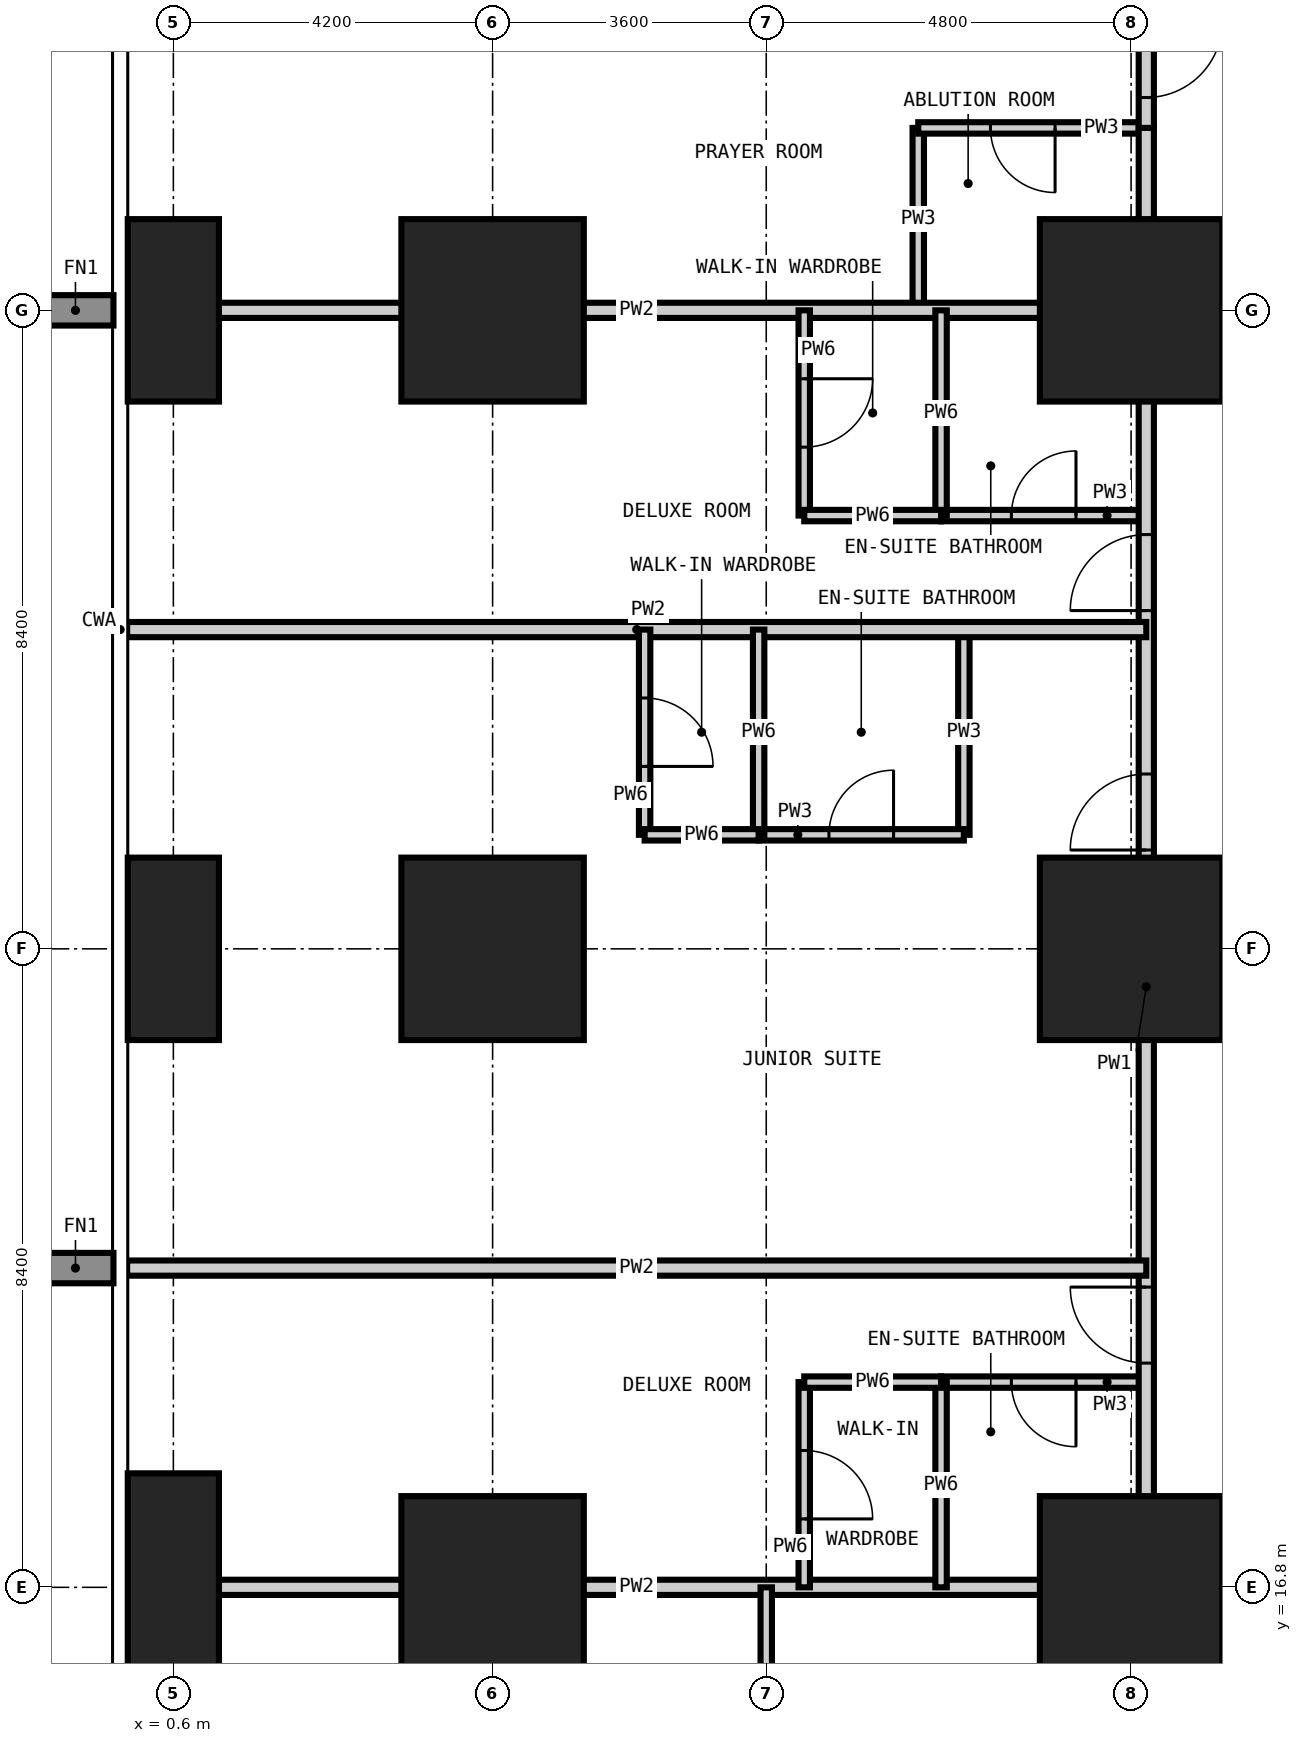
"""IFC4 building model, lengths in metres.
Left out: names, types, materials, properties, quantities, classifications, styles, units other than length and angle.
Written with IfcOpenShell. Run it as: python <this file> out.ifc"""

import sys

from ifc_helpers import new_model, si_unit, direction, frame, frame_2d, origin, origin_2d, place, context, subcontext, project, spatial, rectangle, extrude, element, fill, save


model = new_model("IFC4")
c1 = context("Model", 3, precision=1e-05, world=origin(), true_north=direction((0.0, 1.0)))
c2 = subcontext(c1, "Body", "Model", "MODEL_VIEW")
j1 = project(units=[si_unit("LENGTHUNIT", "METRE"), si_unit("PLANEANGLEUNIT", "RADIAN")], contexts=[c1])
p1 = place(None, origin())
s1 = spatial("IfcSite", under=j1, at=p1, CompositionType="ELEMENT")
p2 = place(p1, origin())
s2 = spatial("IfcBuilding", under=s1, at=p2, CompositionType="ELEMENT")
p3 = place(p2, frame((0.0, 0.0, 84.6)))
s3 = spatial("IfcBuildingStorey", under=s2, at=p3, CompositionType="ELEMENT", Elevation=84.6)
p4 = place(p3, frame((0.6, 16.8, -0.35), z_axis=(0.0, 0.0, 1.0), x_axis=(1.0, 0.0, 0.0)))
e1 = element("IfcColumn", 1, at=p4, inside=s3, PredefinedType="COLUMN", context=c2, shape_type="SweptSolid", body=[
    extrude(rectangle(XDim=1.2, YDim=3.0, at=origin_2d()), origin(), (0.0, 0.0, 1.0), 3.55),
])
for number, where, z_axis, x_axis in (
    (2, (0.6, 25.2, -0.35), (0.0, 0.0, 1.0), (1.0, 0.0, 0.0)),
    (3, (0.6, 33.6, -0.35), (0.0, 0.0, 1.0), (1.0, 0.0, 0.0)),
):
    element("IfcColumn", number, at=place(p3, frame(where, z_axis=z_axis, x_axis=x_axis)), inside=s3, PredefinedType="COLUMN", context=c2, shape_type="SweptSolid", body=[
        extrude(rectangle(XDim=1.2, YDim=2.4, at=origin_2d()), origin(), (0.0, 0.0, 1.0), 3.55),
    ])
for number, where, z_axis, x_axis in (
    (4, (4.8, 16.8, -0.35), (0.0, 0.0, 1.0), (1.0, 0.0, 0.0)),
    (5, (4.8, 25.2, -0.35), (0.0, 0.0, 1.0), (1.0, 0.0, 0.0)),
    (6, (4.8, 33.6, -0.35), (0.0, 0.0, 1.0), (1.0, 0.0, 0.0)),
    (7, (13.2, 16.8, -0.35), (0.0, 0.0, 1.0), (1.0, 0.0, 0.0)),
    (8, (13.2, 25.2, -0.35), (0.0, 0.0, 1.0), (1.0, 0.0, 0.0)),
    (9, (13.2, 33.6, -0.35), (0.0, 0.0, 1.0), (1.0, 0.0, 0.0)),
):
    element("IfcColumn", number, at=place(p3, frame(where, z_axis=z_axis, x_axis=x_axis)), inside=s3, PredefinedType="COLUMN", context=c2, shape_type="SweptSolid", body=[
        extrude(rectangle(XDim=2.4, YDim=2.4, at=origin_2d()), origin(), (0.0, 0.0, 1.0), 3.55),
    ])
p5 = place(p3, frame((10.4, 33.6, 0.0), z_axis=(0.0, 0.0, 1.0), x_axis=(0.0, 1.0, 0.0)))
e10 = element("IfcWall", 10, at=p5, inside=s3, PredefinedType="PARTITIONING", context=c2, shape_type="SweptSolid", body=[
    extrude(rectangle(XDim=2.4, YDim=0.15, at=frame_2d((1.2, 0.0))), origin(), (0.0, 0.0, 1.0), 3.2),
])
p6 = place(p3, frame((11.0, 26.7, 0.0), z_axis=(0.0, 0.0, 1.0), x_axis=(0.0, 1.0, 0.0)))
e11 = element("IfcWall", 11, at=p6, inside=s3, PredefinedType="PARTITIONING", context=c2, shape_type="SweptSolid", body=[
    extrude(rectangle(XDim=2.7, YDim=0.15, at=frame_2d((1.35, 0.0))), origin(), (0.0, 0.0, 1.0), 3.2),
])
p7 = place(p3, frame((10.7, 19.5, 0.0), z_axis=(0.0, 0.0, 1.0), x_axis=(1.0, 0.0, 0.0)))
e12 = element("IfcWall", 12, at=p7, inside=s3, PredefinedType="PARTITIONING", context=c2, shape_type="SweptSolid", body=[
    extrude(rectangle(XDim=2.7, YDim=0.15, at=frame_2d((1.35, 0.0))), origin(), (0.0, 0.0, 1.0), 3.2),
])
p8 = place(p7, frame((0.925, 0.0, 0.0)))
e13 = element("IfcOpeningElement", 13, at=p8, cuts=e12, PredefinedType="OPENING", context=c2, shape_type="SweptSolid", body=[
    extrude(rectangle(XDim=0.85, YDim=2.1, at=frame_2d((0.425, 1.05))), frame((0.0, 0.085, 0.0), z_axis=(0.0, -1.0, 0.0), x_axis=(1.0, 0.0, 0.0)), (0.0, 0.0, 1.0), 0.17),
])
p9 = place(p3, frame((8.3, 26.7, 0.0), z_axis=(0.0, 0.0, 1.0), x_axis=(1.0, 0.0, 0.0)))
e14 = element("IfcWall", 14, at=p9, inside=s3, PredefinedType="PARTITIONING", context=c2, shape_type="SweptSolid", body=[
    extrude(rectangle(XDim=2.7, YDim=0.15, at=frame_2d((1.35, 0.0))), origin(), (0.0, 0.0, 1.0), 3.2),
])
p10 = place(p9, frame((0.925, 0.0, 0.0)))
e15 = element("IfcOpeningElement", 15, at=p10, cuts=e14, PredefinedType="OPENING", context=c2, shape_type="SweptSolid", body=[
    extrude(rectangle(XDim=0.85, YDim=2.1, at=frame_2d((0.425, 1.05))), frame((0.0, 0.085, 0.0), z_axis=(0.0, -1.0, 0.0), x_axis=(1.0, 0.0, 0.0)), (0.0, 0.0, 1.0), 0.17),
])
p11 = place(p3, frame((10.7, 30.9, 0.0), z_axis=(0.0, 0.0, 1.0), x_axis=(1.0, 0.0, 0.0)))
e16 = element("IfcWall", 16, at=p11, inside=s3, PredefinedType="PARTITIONING", context=c2, shape_type="SweptSolid", body=[
    extrude(rectangle(XDim=2.7, YDim=0.15, at=frame_2d((1.35, 0.0))), origin(), (0.0, 0.0, 1.0), 3.2),
])
p12 = place(p11, frame((0.925, 0.0, 0.0)))
e17 = element("IfcOpeningElement", 17, at=p12, cuts=e16, PredefinedType="OPENING", context=c2, shape_type="SweptSolid", body=[
    extrude(rectangle(XDim=0.85, YDim=2.1, at=frame_2d((0.425, 1.05))), frame((0.0, 0.085, 0.0), z_axis=(0.0, -1.0, 0.0), x_axis=(1.0, 0.0, 0.0)), (0.0, 0.0, 1.0), 0.17),
])
p13 = place(p3, frame((10.4, 36.0, 0.0), z_axis=(0.0, 0.0, 1.0), x_axis=(1.0, 0.0, 0.0)))
e18 = element("IfcWall", 18, at=p13, inside=s3, PredefinedType="PARTITIONING", context=c2, shape_type="SweptSolid", body=[
    extrude(rectangle(XDim=3.0, YDim=0.15, at=frame_2d((1.5, 0.0))), origin(), (0.0, 0.0, 1.0), 3.2),
])
p14 = place(p13, frame((0.95, 0.0, 0.0)))
e19 = element("IfcOpeningElement", 19, at=p14, cuts=e18, PredefinedType="OPENING", context=c2, shape_type="SweptSolid", body=[
    extrude(rectangle(XDim=0.85, YDim=2.1, at=frame_2d((0.425, 1.05))), frame((0.0, 0.085, 0.0), z_axis=(0.0, -1.0, 0.0), x_axis=(1.0, 0.0, 0.0)), (0.0, 0.0, 1.0), 0.17),
])
p15 = place(p3, frame((13.4, 13.4, 0.0), z_axis=(0.0, 0.0, 1.0), x_axis=(0.0, 1.0, 0.0)))
e20 = element("IfcWall", 20, at=p15, inside=s3, PredefinedType="PARTITIONING", context=c2, shape_type="SweptSolid", body=[
    extrude(rectangle(XDim=22.6, YDim=0.2, at=frame_2d((11.3, 0.0))), origin(), (0.0, 0.0, 1.0), 3.2),
])
p16 = place(p15, frame((6.35, 0.0, 0.0)))
e21 = element("IfcOpeningElement", 21, at=p16, cuts=e20, PredefinedType="OPENING", context=c2, shape_type="SweptSolid", body=[
    extrude(rectangle(XDim=1.0, YDim=2.2, at=frame_2d((0.5, 1.1))), frame((0.0, 0.11, 0.0), z_axis=(0.0, -1.0, 0.0), x_axis=(1.0, 0.0, 0.0)), (0.0, 0.0, 1.0), 0.22),
])
p17 = place(p15, frame((13.1, 0.0, 0.0)))
e22 = element("IfcOpeningElement", 22, at=p17, cuts=e20, PredefinedType="OPENING", context=c2, shape_type="SweptSolid", body=[
    extrude(rectangle(XDim=1.0, YDim=2.2, at=frame_2d((0.5, 1.1))), frame((0.0, 0.11, 0.0), z_axis=(0.0, -1.0, 0.0), x_axis=(1.0, 0.0, 0.0)), (0.0, 0.0, 1.0), 0.22),
])
p18 = place(p15, frame((16.25, 0.0, 0.0)))
e23 = element("IfcOpeningElement", 23, at=p18, cuts=e20, PredefinedType="OPENING", context=c2, shape_type="SweptSolid", body=[
    extrude(rectangle(XDim=1.0, YDim=2.2, at=frame_2d((0.5, 1.1))), frame((0.0, 0.11, 0.0), z_axis=(0.0, -1.0, 0.0), x_axis=(1.0, 0.0, 0.0)), (0.0, 0.0, 1.0), 0.22),
])
p19 = place(p15, frame((1.1, 0.0, 0.0)))
e24 = element("IfcOpeningElement", 24, at=p19, cuts=e20, PredefinedType="OPENING", context=c2, shape_type="SweptSolid", body=[
    extrude(rectangle(XDim=1.0, YDim=2.2, at=frame_2d((0.5, 1.1))), frame((0.0, 0.11, 0.0), z_axis=(0.0, -1.0, 0.0), x_axis=(1.0, 0.0, 0.0)), (0.0, 0.0, 1.0), 0.22),
])
p20 = place(p3, frame((13.4, 37.8, 0.0), z_axis=(0.0, 0.0, 1.0), x_axis=(0.0, -1.0, 0.0)))
e25 = element("IfcWall", 25, at=p20, inside=s3, PredefinedType="PARTITIONING", context=c2, shape_type="SweptSolid", body=[
    extrude(rectangle(XDim=1.8, YDim=0.2, at=frame_2d((0.9, 0.0))), origin(), (0.0, 0.0, 1.0), 3.2),
])
p21 = place(p20, frame((0.4, 0.0, 0.0)))
e26 = element("IfcOpeningElement", 26, at=p21, cuts=e25, PredefinedType="OPENING", context=c2, shape_type="SweptSolid", body=[
    extrude(rectangle(XDim=1.0, YDim=2.2, at=frame_2d((0.5, 1.1))), frame((0.0, 0.11, 0.0), z_axis=(0.0, -1.0, 0.0), x_axis=(1.0, 0.0, 0.0)), (0.0, 0.0, 1.0), 0.22),
])
for number, where, z_axis, x_axis in (
    (27, (-0.008, 16.8, 0.0), (0.0, 0.0, 1.0), (1.0, 0.0, 0.0)),
    (28, (-0.008, 21.0, 0.0), (0.0, 0.0, 1.0), (1.0, 0.0, 0.0)),
    (29, (-0.008, 29.4, 0.0), (0.0, 0.0, 1.0), (1.0, 0.0, 0.0)),
    (30, (-0.008, 33.6, 0.0), (0.0, 0.0, 1.0), (1.0, 0.0, 0.0)),
):
    element("IfcWall", number, at=place(p3, frame(where, z_axis=z_axis, x_axis=x_axis)), inside=s3, PredefinedType="PARTITIONING", context=c2, shape_type="SweptSolid", body=[
        extrude(rectangle(XDim=13.408, YDim=0.2, at=frame_2d((6.704, 0.0))), origin(), (0.0, 0.0, 1.0), 3.2),
    ])
p22 = place(p3, frame((6.8, 26.7, 0.0), z_axis=(0.0, 0.0, 1.0), x_axis=(0.0, 1.0, 0.0)))
e31 = element("IfcWall", 31, at=p22, inside=s3, PredefinedType="PARTITIONING", context=c2, shape_type="SweptSolid", body=[
    extrude(rectangle(XDim=2.7, YDim=0.15, at=frame_2d((1.35, 0.0))), origin(), (0.0, 0.0, 1.0), 3.2),
])
p23 = place(p22, frame((0.9, 0.0, 0.0)))
e32 = element("IfcOpeningElement", 32, at=p23, cuts=e31, PredefinedType="OPENING", context=c2, shape_type="SweptSolid", body=[
    extrude(rectangle(XDim=0.9, YDim=2.1, at=frame_2d((0.45, 1.05))), frame((0.0, 0.085, 0.0), z_axis=(0.0, -1.0, 0.0), x_axis=(1.0, 0.0, 0.0)), (0.0, 0.0, 1.0), 0.17),
])
p24 = place(p3, frame((8.3, 26.7, 0.0), z_axis=(0.0, 0.0, 1.0), x_axis=(0.0, 1.0, 0.0)))
e33 = element("IfcWall", 33, at=p24, inside=s3, PredefinedType="PARTITIONING", context=c2, shape_type="SweptSolid", body=[
    extrude(rectangle(XDim=2.7, YDim=0.15, at=frame_2d((1.35, 0.0))), origin(), (0.0, 0.0, 1.0), 3.2),
])
p25 = place(p3, frame((8.4, -0.008, 0.0), z_axis=(0.0, 0.0, 1.0), x_axis=(0.0, 1.0, 0.0)))
e34 = element("IfcWall", 34, at=p25, inside=s3, PredefinedType="PARTITIONING", context=c2, shape_type="SweptSolid", body=[
    extrude(rectangle(XDim=16.808, YDim=0.15, at=frame_2d((8.404, 0.0))), origin(), (0.0, 0.0, 1.0), 3.2),
])
p26 = place(p25, frame((1.958, 0.0, 0.0)))
e35 = element("IfcOpeningElement", 35, at=p26, cuts=e34, PredefinedType="OPENING", context=c2, shape_type="SweptSolid", body=[
    extrude(rectangle(XDim=0.9, YDim=2.1, at=frame_2d((0.45, 1.05))), frame((0.0, 0.085, 0.0), z_axis=(0.0, -1.0, 0.0), x_axis=(1.0, 0.0, 0.0)), (0.0, 0.0, 1.0), 0.17),
])
p27 = place(p25, frame((12.158, 0.0, 0.0)))
e36 = element("IfcOpeningElement", 36, at=p27, cuts=e34, PredefinedType="OPENING", context=c2, shape_type="SweptSolid", body=[
    extrude(rectangle(XDim=0.9, YDim=2.1, at=frame_2d((0.45, 1.05))), frame((0.0, 0.085, 0.0), z_axis=(0.0, -1.0, 0.0), x_axis=(1.0, 0.0, 0.0)), (0.0, 0.0, 1.0), 0.17),
])
p28 = place(p3, frame((8.9, 16.8, 0.0), z_axis=(0.0, 0.0, 1.0), x_axis=(0.0, 1.0, 0.0)))
e37 = element("IfcWall", 37, at=p28, inside=s3, PredefinedType="PARTITIONING", context=c2, shape_type="SweptSolid", body=[
    extrude(rectangle(XDim=2.7, YDim=0.15, at=frame_2d((1.35, 0.0))), origin(), (0.0, 0.0, 1.0), 3.2),
])
p29 = place(p28, frame((0.9, 0.0, 0.0)))
e38 = element("IfcOpeningElement", 38, at=p29, cuts=e37, PredefinedType="OPENING", context=c2, shape_type="SweptSolid", body=[
    extrude(rectangle(XDim=0.9, YDim=2.1, at=frame_2d((0.45, 1.05))), frame((0.0, 0.085, 0.0), z_axis=(0.0, -1.0, 0.0), x_axis=(1.0, 0.0, 0.0)), (0.0, 0.0, 1.0), 0.17),
])
p30 = place(p3, frame((8.9, 30.9, 0.0), z_axis=(0.0, 0.0, 1.0), x_axis=(0.0, 1.0, 0.0)))
e39 = element("IfcWall", 39, at=p30, inside=s3, PredefinedType="PARTITIONING", context=c2, shape_type="SweptSolid", body=[
    extrude(rectangle(XDim=2.7, YDim=0.15, at=frame_2d((1.35, 0.0))), origin(), (0.0, 0.0, 1.0), 3.2),
])
p31 = place(p30, frame((0.9, 0.0, 0.0)))
e40 = element("IfcOpeningElement", 40, at=p31, cuts=e39, PredefinedType="OPENING", context=c2, shape_type="SweptSolid", body=[
    extrude(rectangle(XDim=0.9, YDim=2.1, at=frame_2d((0.45, 1.05))), frame((0.0, 0.085, 0.0), z_axis=(0.0, -1.0, 0.0), x_axis=(1.0, 0.0, 0.0)), (0.0, 0.0, 1.0), 0.17),
])
p32 = place(p3, frame((10.7, 16.8, 0.0), z_axis=(0.0, 0.0, 1.0), x_axis=(0.0, 1.0, 0.0)))
e41 = element("IfcWall", 41, at=p32, inside=s3, PredefinedType="PARTITIONING", context=c2, shape_type="SweptSolid", body=[
    extrude(rectangle(XDim=2.7, YDim=0.15, at=frame_2d((1.35, 0.0))), origin(), (0.0, 0.0, 1.0), 3.2),
])
p33 = place(p3, frame((10.7, 30.9, 0.0), z_axis=(0.0, 0.0, 1.0), x_axis=(0.0, 1.0, 0.0)))
e42 = element("IfcWall", 42, at=p33, inside=s3, PredefinedType="PARTITIONING", context=c2, shape_type="SweptSolid", body=[
    extrude(rectangle(XDim=2.7, YDim=0.15, at=frame_2d((1.35, 0.0))), origin(), (0.0, 0.0, 1.0), 3.2),
])
p34 = place(p3, frame((8.9, 19.5, 0.0), z_axis=(0.0, 0.0, 1.0), x_axis=(1.0, 0.0, 0.0)))
e43 = element("IfcWall", 43, at=p34, inside=s3, PredefinedType="PARTITIONING", context=c2, shape_type="SweptSolid", body=[
    extrude(rectangle(XDim=1.8, YDim=0.15, at=frame_2d((0.9, 0.0))), origin(), (0.0, 0.0, 1.0), 3.2),
])
p35 = place(p3, frame((6.8, 26.7, 0.0), z_axis=(0.0, 0.0, 1.0), x_axis=(1.0, 0.0, 0.0)))
e44 = element("IfcWall", 44, at=p35, inside=s3, PredefinedType="PARTITIONING", context=c2, shape_type="SweptSolid", body=[
    extrude(rectangle(XDim=1.5, YDim=0.15, at=frame_2d((0.75, 0.0))), origin(), (0.0, 0.0, 1.0), 3.2),
])
p36 = place(p3, frame((8.9, 30.9, 0.0), z_axis=(0.0, 0.0, 1.0), x_axis=(1.0, 0.0, 0.0)))
e45 = element("IfcWall", 45, at=p36, inside=s3, PredefinedType="PARTITIONING", context=c2, shape_type="SweptSolid", body=[
    extrude(rectangle(XDim=1.8, YDim=0.15, at=frame_2d((0.9, 0.0))), origin(), (0.0, 0.0, 1.0), 3.2),
])
p37 = place(p16, origin())
e46 = element("IfcDoor", 46, at=p37, inside=s3, OperationType="SINGLE_SWING_RIGHT", PredefinedType="DOOR", context=c2, shape_type="SweptSolid", body=[
    extrude(rectangle(XDim=1.0, YDim=2.2, at=frame_2d((0.5, 1.1))), frame((0.0, 0.025, 0.0), z_axis=(0.0, -1.0, 0.0), x_axis=(1.0, 0.0, 0.0)), (0.0, 0.0, 1.0), 0.05),
])
fill(e21, e46)
p38 = place(p8, frame((0.85, 0.0, 0.0), z_axis=(0.0, 0.0, 1.0), x_axis=(-1.0, 0.0, 0.0)))
e47 = element("IfcDoor", 47, at=p38, inside=s3, OperationType="SINGLE_SWING_LEFT", PredefinedType="DOOR", context=c2, shape_type="SweptSolid", body=[
    extrude(rectangle(XDim=0.85, YDim=2.1, at=frame_2d((0.425, 1.05))), frame((0.0, 0.025, 0.0), z_axis=(0.0, -1.0, 0.0), x_axis=(1.0, 0.0, 0.0)), (0.0, 0.0, 1.0), 0.05),
])
fill(e13, e47)
p39 = place(p29, frame((0.9, 0.0, 0.0), z_axis=(0.0, 0.0, 1.0), x_axis=(-1.0, 0.0, 0.0)))
e48 = element("IfcDoor", 48, at=p39, inside=s3, OperationType="SINGLE_SWING_RIGHT", PredefinedType="DOOR", context=c2, shape_type="SweptSolid", body=[
    extrude(rectangle(XDim=0.9, YDim=2.1, at=frame_2d((0.45, 1.05))), frame((0.0, 0.025, 0.0), z_axis=(0.0, -1.0, 0.0), x_axis=(1.0, 0.0, 0.0)), (0.0, 0.0, 1.0), 0.05),
])
fill(e38, e48)
p40 = place(p17, origin())
e49 = element("IfcDoor", 49, at=p40, inside=s3, OperationType="SINGLE_SWING_LEFT", PredefinedType="DOOR", context=c2, shape_type="SweptSolid", body=[
    extrude(rectangle(XDim=1.0, YDim=2.2, at=frame_2d((0.5, 1.1))), frame((0.0, 0.025, 0.0), z_axis=(0.0, -1.0, 0.0), x_axis=(1.0, 0.0, 0.0)), (0.0, 0.0, 1.0), 0.05),
])
fill(e22, e49)
p41 = place(p10, origin())
e50 = element("IfcDoor", 50, at=p41, inside=s3, OperationType="SINGLE_SWING_RIGHT", PredefinedType="DOOR", context=c2, shape_type="SweptSolid", body=[
    extrude(rectangle(XDim=0.85, YDim=2.1, at=frame_2d((0.425, 1.05))), frame((0.0, 0.025, 0.0), z_axis=(0.0, -1.0, 0.0), x_axis=(1.0, 0.0, 0.0)), (0.0, 0.0, 1.0), 0.05),
])
fill(e15, e50)
p42 = place(p23, frame((0.9, 0.0, 0.0), z_axis=(0.0, 0.0, 1.0), x_axis=(-1.0, 0.0, 0.0)))
e51 = element("IfcDoor", 51, at=p42, inside=s3, OperationType="SINGLE_SWING_RIGHT", PredefinedType="DOOR", context=c2, shape_type="SweptSolid", body=[
    extrude(rectangle(XDim=0.9, YDim=2.1, at=frame_2d((0.45, 1.05))), frame((0.0, 0.025, 0.0), z_axis=(0.0, -1.0, 0.0), x_axis=(1.0, 0.0, 0.0)), (0.0, 0.0, 1.0), 0.05),
])
fill(e32, e51)
p43 = place(p18, origin())
e52 = element("IfcDoor", 52, at=p43, inside=s3, OperationType="SINGLE_SWING_LEFT", PredefinedType="DOOR", context=c2, shape_type="SweptSolid", body=[
    extrude(rectangle(XDim=1.0, YDim=2.2, at=frame_2d((0.5, 1.1))), frame((0.0, 0.025, 0.0), z_axis=(0.0, -1.0, 0.0), x_axis=(1.0, 0.0, 0.0)), (0.0, 0.0, 1.0), 0.05),
])
fill(e23, e52)
p44 = place(p12, origin())
e53 = element("IfcDoor", 53, at=p44, inside=s3, OperationType="SINGLE_SWING_RIGHT", PredefinedType="DOOR", context=c2, shape_type="SweptSolid", body=[
    extrude(rectangle(XDim=0.85, YDim=2.1, at=frame_2d((0.425, 1.05))), frame((0.0, 0.025, 0.0), z_axis=(0.0, -1.0, 0.0), x_axis=(1.0, 0.0, 0.0)), (0.0, 0.0, 1.0), 0.05),
])
fill(e17, e53)
p45 = place(p31, frame((0.9, 0.0, 0.0), z_axis=(0.0, 0.0, 1.0), x_axis=(-1.0, 0.0, 0.0)))
e54 = element("IfcDoor", 54, at=p45, inside=s3, OperationType="SINGLE_SWING_LEFT", PredefinedType="DOOR", context=c2, shape_type="SweptSolid", body=[
    extrude(rectangle(XDim=0.9, YDim=2.1, at=frame_2d((0.45, 1.05))), frame((0.0, 0.025, 0.0), z_axis=(0.0, -1.0, 0.0), x_axis=(1.0, 0.0, 0.0)), (0.0, 0.0, 1.0), 0.05),
])
fill(e40, e54)
p46 = place(p21, origin())
e55 = element("IfcDoor", 55, at=p46, inside=s3, OperationType="SINGLE_SWING_LEFT", PredefinedType="DOOR", context=c2, shape_type="SweptSolid", body=[
    extrude(rectangle(XDim=1.0, YDim=2.2, at=frame_2d((0.5, 1.1))), frame((0.0, 0.025, 0.0), z_axis=(0.0, -1.0, 0.0), x_axis=(1.0, 0.0, 0.0)), (0.0, 0.0, 1.0), 0.05),
])
fill(e26, e55)
p47 = place(p14, frame((0.85, 0.0, 0.0), z_axis=(0.0, 0.0, 1.0), x_axis=(-1.0, 0.0, 0.0)))
e56 = element("IfcDoor", 56, at=p47, inside=s3, OperationType="SINGLE_SWING_LEFT", PredefinedType="DOOR", context=c2, shape_type="SweptSolid", body=[
    extrude(rectangle(XDim=0.85, YDim=2.1, at=frame_2d((0.425, 1.05))), frame((0.0, 0.025, 0.0), z_axis=(0.0, -1.0, 0.0), x_axis=(1.0, 0.0, 0.0)), (0.0, 0.0, 1.0), 0.05),
])
fill(e19, e56)
save(model, sys.argv[1])
